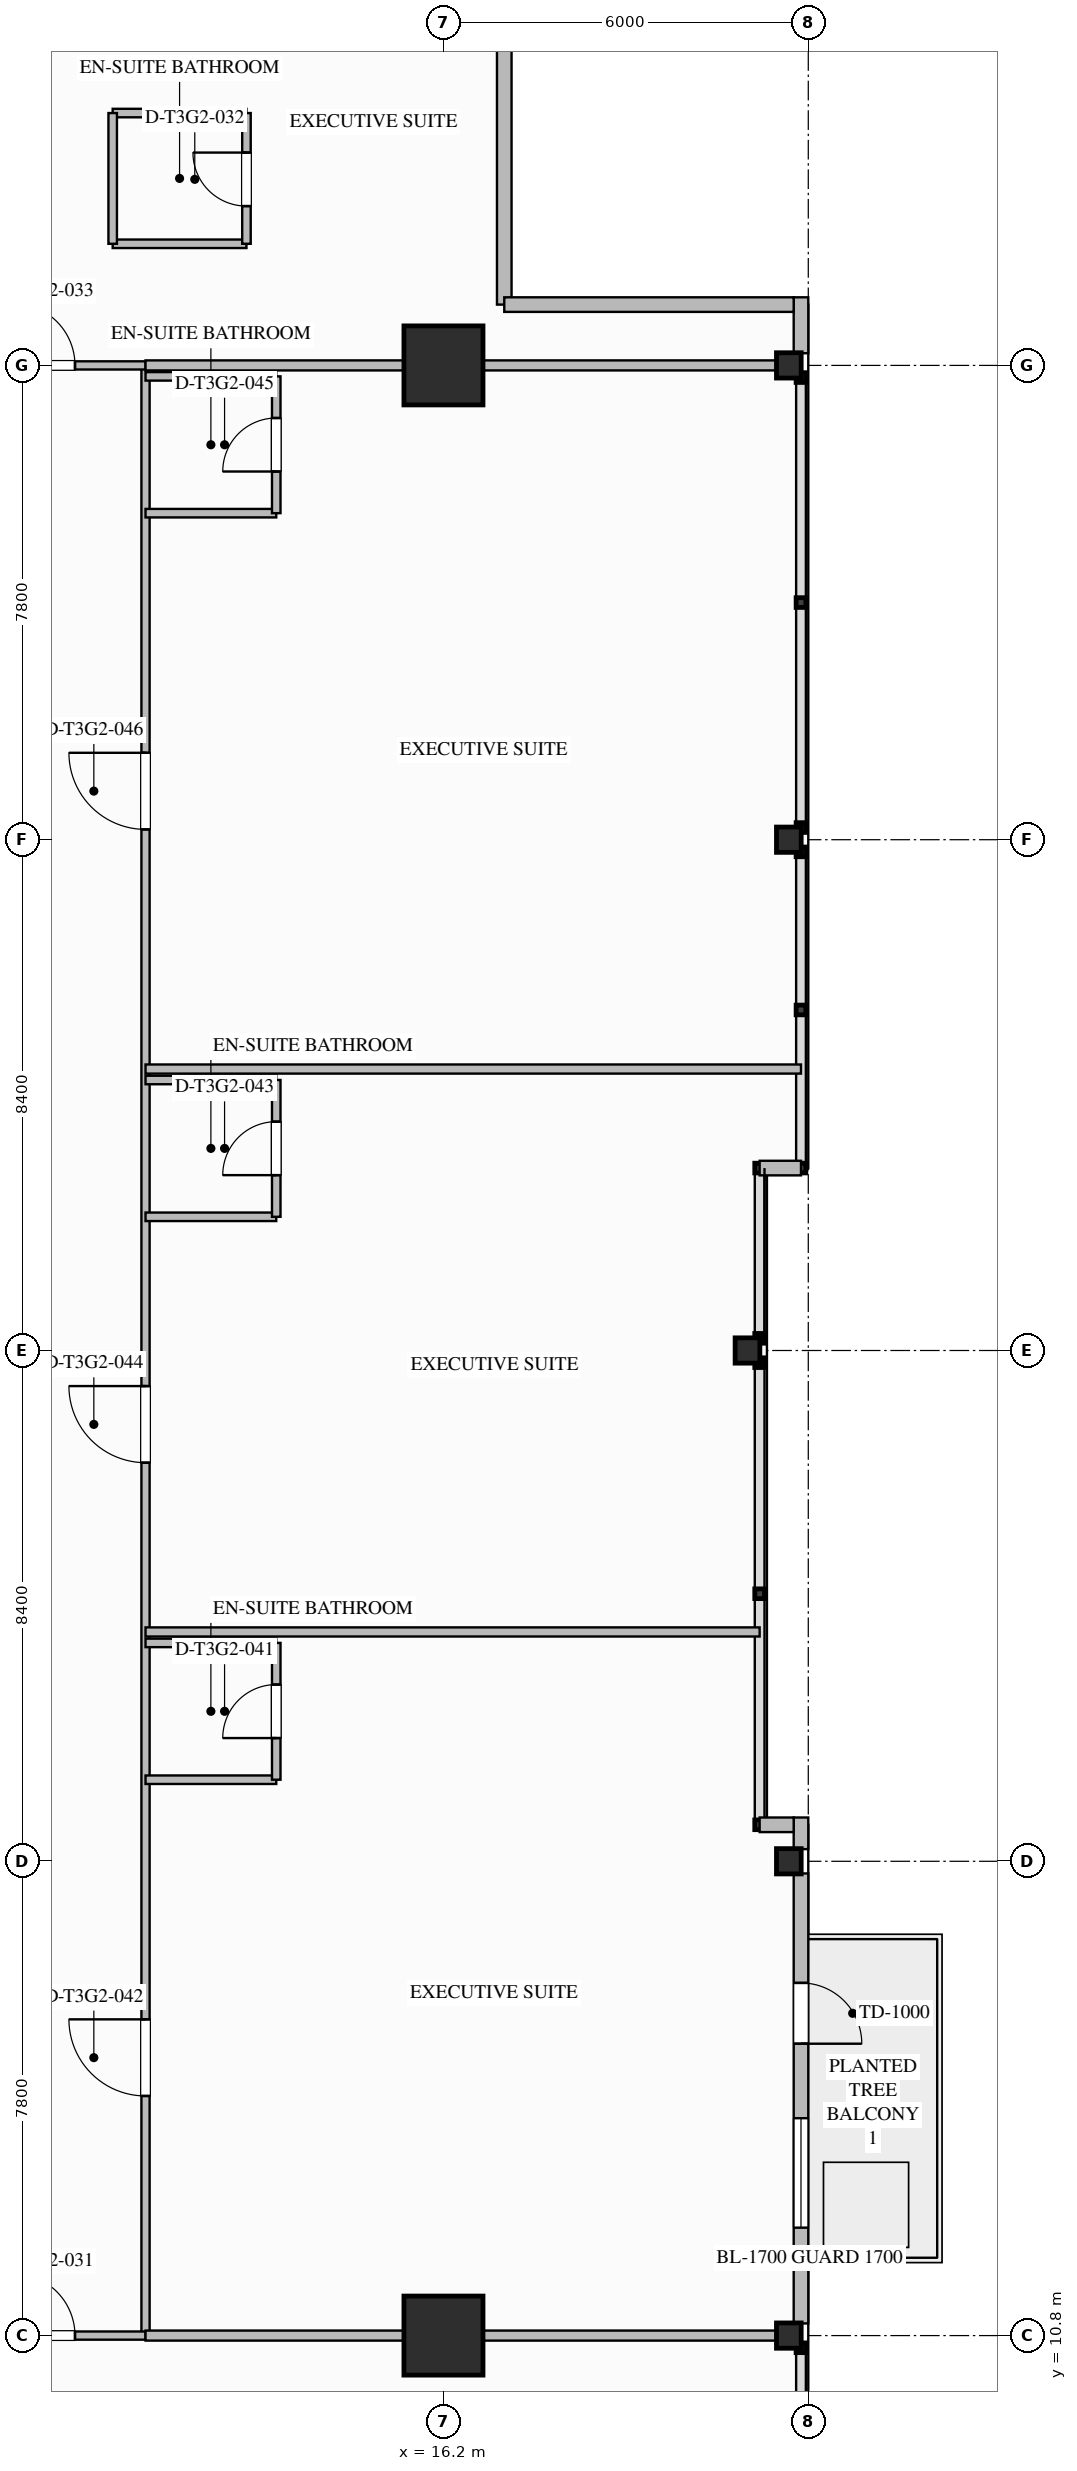
"""IFC4 building model, lengths in metres.
Left out: names, types, materials, properties, quantities, classifications, styles, units other than length and angle.
Written with IfcOpenShell. Run it as: python <this file> out.ifc"""

import sys

from ifc_helpers import new_model, si_unit, direction, frame, frame_2d, origin, origin_2d, place, context, subcontext, project, spatial, rectangle, i_section, extrude, element, fill, save


model = new_model("IFC4")
c1 = context("Model", 3, precision=1e-05, world=origin(), true_north=direction((0.0, 1.0)))
c2 = subcontext(c1, "Body", "Model", "MODEL_VIEW")
j1 = project(units=[si_unit("LENGTHUNIT", "METRE"), si_unit("PLANEANGLEUNIT", "RADIAN")], contexts=[c1])
p1 = place(None, origin())
s1 = spatial("IfcSite", under=j1, at=p1, CompositionType="ELEMENT")
p2 = place(p1, origin())
s2 = spatial("IfcBuilding", under=s1, at=p2, CompositionType="ELEMENT")
p3 = place(p2, frame((0.0, 0.0, 161.05)))
s3 = spatial("IfcBuildingStorey", under=s2, at=p3, CompositionType="ELEMENT", Elevation=161.05)
for number, where, z_axis, x_axis in (
    (1, (16.2, 10.8, 0.0), (0.0, 0.0, 1.0), (1.0, 0.0, 0.0)),
    (2, (16.2, 43.2, 0.0), (0.0, 0.0, 1.0), (1.0, 0.0, 0.0)),
):
    element("IfcColumn", number, at=place(p3, frame(where, z_axis=z_axis, x_axis=x_axis)), inside=s3, PredefinedType="COLUMN", context=c2, shape_type="SweptSolid", body=[
        extrude(rectangle(XDim=1.3, YDim=1.3, at=origin_2d()), origin(), (0.0, 0.0, 1.0), 3.55),
    ])
for number, where, z_axis, x_axis in (
    (3, (21.88, 10.8, 0.0), (0.0, 0.0, 1.0), (1.0, 0.0, 0.0)),
    (4, (21.88, 18.6, 0.0), (0.0, 0.0, 1.0), (1.0, 0.0, 0.0)),
    (5, (21.2, 27.0, 0.0), (0.0, 0.0, 1.0), (1.0, 0.0, 0.0)),
    (6, (21.88, 35.4, 0.0), (0.0, 0.0, 1.0), (1.0, 0.0, 0.0)),
    (7, (21.88, 43.2, 0.0), (0.0, 0.0, 1.0), (1.0, 0.0, 0.0)),
):
    element("IfcColumn", number, at=place(p3, frame(where, z_axis=z_axis, x_axis=x_axis)), inside=s3, PredefinedType="COLUMN", context=c2, shape_type="SweptSolid", body=[
        extrude(i_section(OverallWidth=0.406, OverallDepth=0.416, WebThickness=0.03, FlangeThickness=0.048, FilletRadius=0.028, at=origin_2d()), origin(), (0.0, 0.0, 1.0), 3.547),
    ])
p4 = place(p3, frame((22.08, 44.32, 0.0), z_axis=(0.0, 0.0, 1.0), x_axis=(0.0, -1.0, 0.0)))
e8 = element("IfcWall", 8, at=p4, inside=s3, PredefinedType="STANDARD", context=c2, shape_type="SweptSolid", body=[
    extrude(rectangle(XDim=0.92, YDim=0.24, at=frame_2d((0.46, 0.0))), origin(), (0.0, 0.0, 1.0), 3.29),
])
p5 = place(p3, frame((22.08, 18.4, 0.0), z_axis=(0.0, 0.0, 1.0), x_axis=(0.0, -1.0, 0.0)))
e9 = element("IfcWall", 9, at=p5, inside=s3, PredefinedType="STANDARD", context=c2, shape_type="SweptSolid", body=[
    extrude(rectangle(XDim=7.4, YDim=0.24, at=frame_2d((3.7, 0.0))), origin(), (0.0, 0.0, 1.0), 2.753),
])
p6 = place(p5, frame((1.8, 0.0, 0.0)))
e10 = element("IfcOpeningElement", 10, at=p6, cuts=e9, PredefinedType="OPENING", context=c2, shape_type="SweptSolid", body=[
    extrude(rectangle(XDim=1.0, YDim=2.2, at=frame_2d((0.5, 1.1))), frame((0.0, 0.13, 0.0), z_axis=(0.0, -1.0, 0.0), x_axis=(1.0, 0.0, 0.0)), (0.0, 0.0, 1.0), 0.26),
])
p7 = place(p5, frame((4.025, 0.0, 0.75)))
e11 = element("IfcOpeningElement", 11, at=p7, cuts=e9, PredefinedType="OPENING", context=c2, shape_type="SweptSolid", body=[
    extrude(rectangle(XDim=1.8, YDim=1.903, at=frame_2d((0.9, 0.952))), frame((0.0, 0.13, 0.0), z_axis=(0.0, -1.0, 0.0), x_axis=(1.0, 0.0, 0.0)), (0.0, 0.0, 1.0), 0.26),
])
p8 = place(p3, frame((22.08, 19.32, 0.0), z_axis=(0.0, 0.0, 1.0), x_axis=(0.0, -1.0, 0.0)))
e12 = element("IfcWall", 12, at=p8, inside=s3, PredefinedType="STANDARD", context=c2, shape_type="SweptSolid", body=[
    extrude(rectangle(XDim=0.52, YDim=0.24, at=frame_2d((0.26, 0.0))), origin(), (0.0, 0.0, 1.0), 3.29),
])
for number, where, z_axis, x_axis in (
    (13, (17.2, 48.96, 0.0), (0.0, 0.0, 1.0), (0.0, -1.0, 0.0)),
    (14, (17.2, 44.2, 0.0), (0.0, 0.0, 1.0), (1.0, 0.0, 0.0)),
):
    element("IfcWall", number, at=place(p3, frame(where, z_axis=z_axis, x_axis=x_axis)), inside=s3, PredefinedType="STANDARD", context=c2, shape_type="SweptSolid", body=[
        extrude(rectangle(XDim=4.76, YDim=0.24, at=frame_2d((2.38, 0.0))), origin(), (0.0, 0.0, 1.0), 3.29),
    ])
p9 = place(p3, frame((22.08, 30.0, 0.0), z_axis=(0.0, 0.0, 1.0), x_axis=(-1.0, 0.0, 0.0)))
e15 = element("IfcWall", 15, at=p9, inside=s3, PredefinedType="STANDARD", context=c2, shape_type="SweptSolid", body=[
    extrude(rectangle(XDim=0.68, YDim=0.24, at=frame_2d((0.34, 0.0))), origin(), (0.0, 0.0, 1.0), 3.29),
])
p10 = place(p3, frame((21.4, 19.2, 0.0), z_axis=(0.0, 0.0, 1.0), x_axis=(1.0, 0.0, 0.0)))
e16 = element("IfcWall", 16, at=p10, inside=s3, PredefinedType="STANDARD", context=c2, shape_type="SweptSolid", body=[
    extrude(rectangle(XDim=0.56, YDim=0.24, at=frame_2d((0.28, 0.0))), origin(), (0.0, 0.0, 1.0), 3.29),
])
p11 = place(p3, frame((11.3, 10.8, 0.0), z_axis=(0.0, 0.0, 1.0), x_axis=(0.0, 1.0, 0.0)))
e17 = element("IfcWall", 17, at=p11, inside=s3, PredefinedType="PARTITIONING", context=c2, shape_type="SweptSolid", body=[
    extrude(rectangle(XDim=32.4, YDim=0.135, at=frame_2d((16.2, 0.0))), origin(), (0.0, 0.0, 1.0), 3.29),
])
p12 = place(p11, frame((3.941, 0.0, 0.0)))
e18 = element("IfcOpeningElement", 18, at=p12, cuts=e17, PredefinedType="OPENING", context=c2, shape_type="SweptSolid", body=[
    extrude(rectangle(XDim=1.26, YDim=2.2, at=frame_2d((0.63, 1.1))), frame((0.0, 0.077, 0.0), z_axis=(0.0, -1.0, 0.0), x_axis=(1.0, 0.0, 0.0)), (0.0, 0.0, 1.0), 0.155),
])
p13 = place(p11, frame((14.355, 0.0, 0.0)))
e19 = element("IfcOpeningElement", 19, at=p13, cuts=e17, PredefinedType="OPENING", context=c2, shape_type="SweptSolid", body=[
    extrude(rectangle(XDim=1.26, YDim=2.2, at=frame_2d((0.63, 1.1))), frame((0.0, 0.077, 0.0), z_axis=(0.0, -1.0, 0.0), x_axis=(1.0, 0.0, 0.0)), (0.0, 0.0, 1.0), 0.155),
])
p14 = place(p11, frame((24.769, 0.0, 0.0)))
e20 = element("IfcOpeningElement", 20, at=p14, cuts=e17, PredefinedType="OPENING", context=c2, shape_type="SweptSolid", body=[
    extrude(rectangle(XDim=1.26, YDim=2.2, at=frame_2d((0.63, 1.1))), frame((0.0, 0.077, 0.0), z_axis=(0.0, -1.0, 0.0), x_axis=(1.0, 0.0, 0.0)), (0.0, 0.0, 1.0), 0.155),
])
p15 = place(p3, frame((8.6, 10.8, 0.0), z_axis=(0.0, 0.0, 1.0), x_axis=(1.0, 0.0, 0.0)))
e21 = element("IfcWall", 21, at=p15, inside=s3, PredefinedType="PARTITIONING", context=c2, shape_type="SweptSolid", body=[
    extrude(rectangle(XDim=2.7, YDim=0.135, at=frame_2d((1.35, 0.0))), origin(), (0.0, 0.0, 1.0), 2.58),
])
p16 = place(p15, frame((0.52, 0.0, 0.0)))
e22 = element("IfcOpeningElement", 22, at=p16, cuts=e21, PredefinedType="OPENING", context=c2, shape_type="SweptSolid", body=[
    extrude(rectangle(XDim=1.02, YDim=2.15, at=frame_2d((0.51, 1.075))), frame((0.0, 0.077, 0.0), z_axis=(0.0, -1.0, 0.0), x_axis=(1.0, 0.0, 0.0)), (0.0, 0.0, 1.0), 0.155),
])
p17 = place(p3, frame((8.6, 43.2, 0.0), z_axis=(0.0, 0.0, 1.0), x_axis=(1.0, 0.0, 0.0)))
e23 = element("IfcWall", 23, at=p17, inside=s3, PredefinedType="PARTITIONING", context=c2, shape_type="SweptSolid", body=[
    extrude(rectangle(XDim=2.7, YDim=0.135, at=frame_2d((1.35, 0.0))), origin(), (0.0, 0.0, 1.0), 2.58),
])
p18 = place(p17, frame((0.52, 0.0, 0.0)))
e24 = element("IfcOpeningElement", 24, at=p18, cuts=e23, PredefinedType="OPENING", context=c2, shape_type="SweptSolid", body=[
    extrude(rectangle(XDim=1.02, YDim=2.15, at=frame_2d((0.51, 1.075))), frame((0.0, 0.077, 0.0), z_axis=(0.0, -1.0, 0.0), x_axis=(1.0, 0.0, 0.0)), (0.0, 0.0, 1.0), 0.155),
])
for number, where, z_axis, x_axis in (
    (25, (11.3, 10.8, 0.0), (0.0, 0.0, 1.0), (1.0, 0.0, 0.0)),
    (26, (11.3, 43.2, 0.0), (0.0, 0.0, 1.0), (1.0, 0.0, 0.0)),
):
    element("IfcWall", number, at=place(p3, frame(where, z_axis=z_axis, x_axis=x_axis)), inside=s3, PredefinedType="PARTITIONING", context=c2, shape_type="SweptSolid", body=[
        extrude(rectangle(XDim=10.78, YDim=0.165, at=frame_2d((5.39, 0.0))), origin(), (0.0, 0.0, 1.0), 2.58),
    ])
for number, where, z_axis, x_axis in (
    (27, (10.76, 45.2, 0.0), (0.0, 0.0, 1.0), (1.0, 0.0, 0.0)),
    (28, (10.76, 47.35, 0.0), (0.0, 0.0, 1.0), (1.0, 0.0, 0.0)),
):
    element("IfcWall", number, at=place(p3, frame(where, z_axis=z_axis, x_axis=x_axis)), inside=s3, PredefinedType="PLUMBINGWALL", context=c2, shape_type="SweptSolid", body=[
        extrude(rectangle(XDim=2.2, YDim=0.14, at=frame_2d((1.1, 0.0))), origin(), (0.0, 0.0, 1.0), 3.29),
    ])
p19 = place(p3, frame((10.76, 45.2, 0.0), z_axis=(0.0, 0.0, 1.0), x_axis=(0.0, 1.0, 0.0)))
e29 = element("IfcWall", 29, at=p19, inside=s3, PredefinedType="PLUMBINGWALL", context=c2, shape_type="SweptSolid", body=[
    extrude(rectangle(XDim=2.15, YDim=0.14, at=frame_2d((1.075, 0.0))), origin(), (0.0, 0.0, 1.0), 3.29),
])
p20 = place(p3, frame((12.96, 45.2, 0.0), z_axis=(0.0, 0.0, 1.0), x_axis=(0.0, 1.0, 0.0)))
e30 = element("IfcWall", 30, at=p20, inside=s3, PredefinedType="PLUMBINGWALL", context=c2, shape_type="SweptSolid", body=[
    extrude(rectangle(XDim=2.15, YDim=0.14, at=frame_2d((1.075, 0.0))), origin(), (0.0, 0.0, 1.0), 3.29),
])
p21 = place(p20, frame((0.62, 0.0, 0.0)))
e31 = element("IfcOpeningElement", 31, at=p21, cuts=e30, PredefinedType="OPENING", context=c2, shape_type="SweptSolid", body=[
    extrude(rectangle(XDim=0.88, YDim=2.1, at=frame_2d((0.44, 1.05))), frame((0.0, 0.08, 0.0), z_axis=(0.0, -1.0, 0.0), x_axis=(1.0, 0.0, 0.0)), (0.0, 0.0, 1.0), 0.16),
])
for number, where, z_axis, x_axis in (
    (32, (11.3, 19.941, 0.0), (0.0, 0.0, 1.0), (1.0, 0.0, 0.0)),
    (33, (11.3, 22.191, 0.0), (0.0, 0.0, 1.0), (1.0, 0.0, 0.0)),
):
    element("IfcWall", number, at=place(p3, frame(where, z_axis=z_axis, x_axis=x_axis)), inside=s3, PredefinedType="PLUMBINGWALL", context=c2, shape_type="SweptSolid", body=[
        extrude(rectangle(XDim=2.15, YDim=0.14, at=frame_2d((1.075, 0.0))), origin(), (0.0, 0.0, 1.0), 3.29),
    ])
p22 = place(p3, frame((13.45, 19.941, 0.0), z_axis=(0.0, 0.0, 1.0), x_axis=(0.0, 1.0, 0.0)))
e34 = element("IfcWall", 34, at=p22, inside=s3, PredefinedType="PLUMBINGWALL", context=c2, shape_type="SweptSolid", body=[
    extrude(rectangle(XDim=2.25, YDim=0.14, at=frame_2d((1.125, 0.0))), origin(), (0.0, 0.0, 1.0), 3.29),
])
p23 = place(p22, frame((0.685, 0.0, 0.0)))
e35 = element("IfcOpeningElement", 35, at=p23, cuts=e34, PredefinedType="OPENING", context=c2, shape_type="SweptSolid", body=[
    extrude(rectangle(XDim=0.88, YDim=2.1, at=frame_2d((0.44, 1.05))), frame((0.0, 0.08, 0.0), z_axis=(0.0, -1.0, 0.0), x_axis=(1.0, 0.0, 0.0)), (0.0, 0.0, 1.0), 0.16),
])
p24 = place(p3, frame((11.3, 22.371, 0.0), z_axis=(0.0, 0.0, 1.0), x_axis=(1.0, 0.0, 0.0)))
e36 = element("IfcWall", 36, at=p24, inside=s3, PredefinedType="PARTITIONING", context=c2, shape_type="SweptSolid", body=[
    extrude(rectangle(XDim=10.1, YDim=0.15, at=frame_2d((5.05, 0.0))), origin(), (0.0, 0.0, 1.0), 3.29),
])
for number, where, z_axis, x_axis in (
    (37, (11.3, 29.198, 0.0), (0.0, 0.0, 1.0), (1.0, 0.0, 0.0)),
    (38, (11.3, 31.448, 0.0), (0.0, 0.0, 1.0), (1.0, 0.0, 0.0)),
):
    element("IfcWall", number, at=place(p3, frame(where, z_axis=z_axis, x_axis=x_axis)), inside=s3, PredefinedType="PLUMBINGWALL", context=c2, shape_type="SweptSolid", body=[
        extrude(rectangle(XDim=2.15, YDim=0.14, at=frame_2d((1.075, 0.0))), origin(), (0.0, 0.0, 1.0), 3.29),
    ])
p25 = place(p3, frame((13.45, 29.198, 0.0), z_axis=(0.0, 0.0, 1.0), x_axis=(0.0, 1.0, 0.0)))
e39 = element("IfcWall", 39, at=p25, inside=s3, PredefinedType="PLUMBINGWALL", context=c2, shape_type="SweptSolid", body=[
    extrude(rectangle(XDim=2.25, YDim=0.14, at=frame_2d((1.125, 0.0))), origin(), (0.0, 0.0, 1.0), 3.29),
])
p26 = place(p25, frame((0.685, 0.0, 0.0)))
e40 = element("IfcOpeningElement", 40, at=p26, cuts=e39, PredefinedType="OPENING", context=c2, shape_type="SweptSolid", body=[
    extrude(rectangle(XDim=0.88, YDim=2.1, at=frame_2d((0.44, 1.05))), frame((0.0, 0.08, 0.0), z_axis=(0.0, -1.0, 0.0), x_axis=(1.0, 0.0, 0.0)), (0.0, 0.0, 1.0), 0.16),
])
p27 = place(p3, frame((11.3, 31.629, 0.0), z_axis=(0.0, 0.0, 1.0), x_axis=(1.0, 0.0, 0.0)))
e41 = element("IfcWall", 41, at=p27, inside=s3, PredefinedType="PARTITIONING", context=c2, shape_type="SweptSolid", body=[
    extrude(rectangle(XDim=10.78, YDim=0.15, at=frame_2d((5.39, 0.0))), origin(), (0.0, 0.0, 1.0), 3.29),
])
p28 = place(p3, frame((11.3, 40.77, 0.0), z_axis=(0.0, 0.0, 1.0), x_axis=(1.0, 0.0, 0.0)))
e42 = element("IfcWall", 42, at=p28, inside=s3, PredefinedType="PLUMBINGWALL", context=c2, shape_type="SweptSolid", body=[
    extrude(rectangle(XDim=2.15, YDim=0.14, at=frame_2d((1.075, 0.0))), origin(), (0.0, 0.0, 1.0), 3.29),
])
p29 = place(p3, frame((11.3, 43.02, 0.0), z_axis=(0.0, 0.0, 1.0), x_axis=(1.0, 0.0, 0.0)))
e43 = element("IfcWall", 43, at=p29, inside=s3, PredefinedType="PLUMBINGWALL", context=c2, shape_type="SweptSolid", body=[
    extrude(rectangle(XDim=2.15, YDim=0.14, at=frame_2d((1.075, 0.0))), origin(), (0.0, 0.0, 1.0), 2.58),
])
p30 = place(p3, frame((13.45, 40.77, 0.0), z_axis=(0.0, 0.0, 1.0), x_axis=(0.0, 1.0, 0.0)))
e44 = element("IfcWall", 44, at=p30, inside=s3, PredefinedType="PLUMBINGWALL", context=c2, shape_type="SweptSolid", body=[
    extrude(rectangle(XDim=2.25, YDim=0.14, at=frame_2d((1.125, 0.0))), origin(), (0.0, 0.0, 1.0), 3.29),
])
p31 = place(p30, frame((0.685, 0.0, 0.0)))
e45 = element("IfcOpeningElement", 45, at=p31, cuts=e44, PredefinedType="OPENING", context=c2, shape_type="SweptSolid", body=[
    extrude(rectangle(XDim=0.88, YDim=2.1, at=frame_2d((0.44, 1.05))), frame((0.0, 0.08, 0.0), z_axis=(0.0, -1.0, 0.0), x_axis=(1.0, 0.0, 0.0)), (0.0, 0.0, 1.0), 0.16),
])
p32 = place(p6, origin())
e46 = element("IfcDoor", 46, at=p32, inside=s3, OperationType="SINGLE_SWING_RIGHT", PredefinedType="DOOR", context=c2, shape_type="SweptSolid", body=[
    extrude(rectangle(XDim=1.0, YDim=2.2, at=frame_2d((0.5, 1.1))), frame((0.0, 0.025, 0.0), z_axis=(0.0, -1.0, 0.0), x_axis=(1.0, 0.0, 0.0)), (0.0, 0.0, 1.0), 0.05),
])
fill(e10, e46)
p33 = place(p7, origin())
e47 = element("IfcWindow", 47, at=p33, inside=s3, PartitioningType="SINGLE_PANEL", PredefinedType="WINDOW", context=c2, shape_type="SweptSolid", body=[
    extrude(rectangle(XDim=1.8, YDim=1.903, at=frame_2d((0.9, 0.952))), frame((0.0, 0.03, 0.0), z_axis=(0.0, -1.0, 0.0), x_axis=(1.0, 0.0, 0.0)), (0.0, 0.0, 1.0), 0.06),
])
fill(e11, e47)
p34 = place(p16, origin())
e48 = element("IfcDoor", 48, at=p34, inside=s3, OperationType="SINGLE_SWING_LEFT", PredefinedType="DOOR", context=c2, shape_type="SweptSolid", body=[
    extrude(rectangle(XDim=1.02, YDim=2.15, at=frame_2d((0.51, 1.075))), frame((0.0, 0.025, 0.0), z_axis=(0.0, -1.0, 0.0), x_axis=(1.0, 0.0, 0.0)), (0.0, 0.0, 1.0), 0.05),
])
fill(e22, e48)
p35 = place(p21, origin())
e49 = element("IfcDoor", 49, at=p35, inside=s3, OperationType="SINGLE_SWING_RIGHT", PredefinedType="DOOR", context=c2, shape_type="SweptSolid", body=[
    extrude(rectangle(XDim=0.88, YDim=2.1, at=frame_2d((0.44, 1.05))), frame((0.0, 0.025, 0.0), z_axis=(0.0, -1.0, 0.0), x_axis=(1.0, 0.0, 0.0)), (0.0, 0.0, 1.0), 0.05),
])
fill(e31, e49)
p36 = place(p18, origin())
e50 = element("IfcDoor", 50, at=p36, inside=s3, OperationType="SINGLE_SWING_LEFT", PredefinedType="DOOR", context=c2, shape_type="SweptSolid", body=[
    extrude(rectangle(XDim=1.02, YDim=2.15, at=frame_2d((0.51, 1.075))), frame((0.0, 0.025, 0.0), z_axis=(0.0, -1.0, 0.0), x_axis=(1.0, 0.0, 0.0)), (0.0, 0.0, 1.0), 0.05),
])
fill(e24, e50)
p37 = place(p23, origin())
e51 = element("IfcDoor", 51, at=p37, inside=s3, OperationType="SINGLE_SWING_LEFT", PredefinedType="DOOR", context=c2, shape_type="SweptSolid", body=[
    extrude(rectangle(XDim=0.88, YDim=2.1, at=frame_2d((0.44, 1.05))), frame((0.0, 0.025, 0.0), z_axis=(0.0, -1.0, 0.0), x_axis=(1.0, 0.0, 0.0)), (0.0, 0.0, 1.0), 0.05),
])
fill(e35, e51)
p38 = place(p12, origin())
e52 = element("IfcDoor", 52, at=p38, inside=s3, OperationType="SINGLE_SWING_RIGHT", PredefinedType="DOOR", context=c2, shape_type="SweptSolid", body=[
    extrude(rectangle(XDim=1.26, YDim=2.2, at=frame_2d((0.63, 1.1))), frame((0.0, 0.025, 0.0), z_axis=(0.0, -1.0, 0.0), x_axis=(1.0, 0.0, 0.0)), (0.0, 0.0, 1.0), 0.05),
])
fill(e18, e52)
p39 = place(p26, origin())
e53 = element("IfcDoor", 53, at=p39, inside=s3, OperationType="SINGLE_SWING_LEFT", PredefinedType="DOOR", context=c2, shape_type="SweptSolid", body=[
    extrude(rectangle(XDim=0.88, YDim=2.1, at=frame_2d((0.44, 1.05))), frame((0.0, 0.025, 0.0), z_axis=(0.0, -1.0, 0.0), x_axis=(1.0, 0.0, 0.0)), (0.0, 0.0, 1.0), 0.05),
])
fill(e40, e53)
p40 = place(p13, origin())
e54 = element("IfcDoor", 54, at=p40, inside=s3, OperationType="SINGLE_SWING_RIGHT", PredefinedType="DOOR", context=c2, shape_type="SweptSolid", body=[
    extrude(rectangle(XDim=1.26, YDim=2.2, at=frame_2d((0.63, 1.1))), frame((0.0, 0.025, 0.0), z_axis=(0.0, -1.0, 0.0), x_axis=(1.0, 0.0, 0.0)), (0.0, 0.0, 1.0), 0.05),
])
fill(e19, e54)
p41 = place(p31, origin())
e55 = element("IfcDoor", 55, at=p41, inside=s3, OperationType="SINGLE_SWING_LEFT", PredefinedType="DOOR", context=c2, shape_type="SweptSolid", body=[
    extrude(rectangle(XDim=0.88, YDim=2.1, at=frame_2d((0.44, 1.05))), frame((0.0, 0.025, 0.0), z_axis=(0.0, -1.0, 0.0), x_axis=(1.0, 0.0, 0.0)), (0.0, 0.0, 1.0), 0.05),
])
fill(e45, e55)
p42 = place(p14, origin())
e56 = element("IfcDoor", 56, at=p42, inside=s3, OperationType="SINGLE_SWING_RIGHT", PredefinedType="DOOR", context=c2, shape_type="SweptSolid", body=[
    extrude(rectangle(XDim=1.26, YDim=2.2, at=frame_2d((0.63, 1.1))), frame((0.0, 0.025, 0.0), z_axis=(0.0, -1.0, 0.0), x_axis=(1.0, 0.0, 0.0)), (0.0, 0.0, 1.0), 0.05),
])
fill(e20, e56)
save(model, sys.argv[1])
